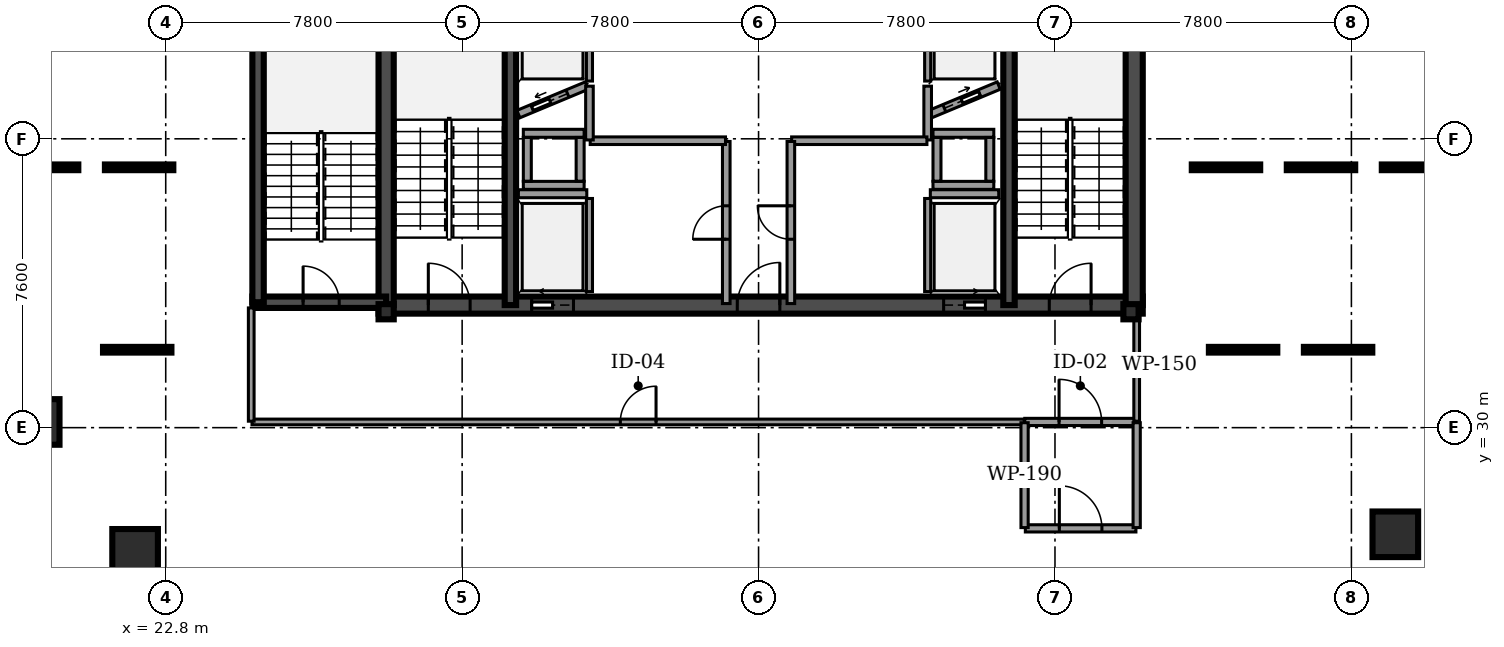
"""IFC4 building model, lengths in metres.
Left out: names, types, materials, properties, quantities, classifications, styles, units other than length and angle.
Written with IfcOpenShell. Run it as: python <this file> out.ifc"""

import sys

from ifc_helpers import new_model, si_unit, direction, frame, frame_2d, origin, origin_2d, place, context, subcontext, project, spatial, rectangle, hollow_rectangle, extrude, element, fill, save


model = new_model("IFC4")
c1 = context("Model", 3, precision=1e-05, world=origin(), true_north=direction((0.0, 1.0)))
c2 = subcontext(c1, "Body", "Model", "MODEL_VIEW")
j1 = project(units=[si_unit("LENGTHUNIT", "METRE"), si_unit("PLANEANGLEUNIT", "RADIAN")], contexts=[c1])
p1 = place(None, origin())
s1 = spatial("IfcSite", under=j1, at=p1, CompositionType="ELEMENT")
p2 = place(p1, origin())
s2 = spatial("IfcBuilding", under=s1, at=p2, CompositionType="ELEMENT")
p3 = place(p2, frame((0.0, 0.0, -8.16)))
s3 = spatial("IfcBuildingStorey", under=s2, at=p3, CompositionType="ELEMENT", Elevation=-8.16)
p4 = place(p3, frame((28.4, 33.225, 0.0), z_axis=(0.0, 0.0, 1.0), x_axis=(1.0, 0.0, 0.0)))
e1 = element("IfcWall", 1, at=p4, inside=s3, PredefinedType="SHEAR", context=c2, shape_type="SweptSolid", body=[
    extrude(rectangle(XDim=20.11, YDim=0.45, at=frame_2d((10.055, 0.0))), origin(), (0.0, 0.0, 1.0), 3.76),
])
p5 = place(p4, frame((4.03, 0.0, 0.0)))
e2 = element("IfcOpeningElement", 2, at=p5, cuts=e1, PredefinedType="OPENING", context=c2, shape_type="SweptSolid", body=[
    extrude(rectangle(XDim=1.1, YDim=2.15, at=frame_2d((0.55, 1.075))), frame((0.0, 0.235, 0.0), z_axis=(0.0, -1.0, 0.0), x_axis=(1.0, 0.0, 0.0)), (0.0, 0.0, 1.0), 0.47),
])
p6 = place(p4, frame((14.87, 0.0, 0.0)))
e3 = element("IfcOpeningElement", 3, at=p6, cuts=e1, PredefinedType="OPENING", context=c2, shape_type="SweptSolid", body=[
    extrude(rectangle(XDim=1.1, YDim=2.15, at=frame_2d((0.55, 1.075))), frame((0.0, 0.235, 0.0), z_axis=(0.0, -1.0, 0.0), x_axis=(1.0, 0.0, 0.0)), (0.0, 0.0, 1.0), 0.47),
])
p7 = place(p4, frame((1.31, 0.0, 0.0)))
e4 = element("IfcOpeningElement", 4, at=p7, cuts=e1, PredefinedType="OPENING", context=c2, shape_type="SweptSolid", body=[
    extrude(rectangle(XDim=1.1, YDim=2.2, at=frame_2d((0.55, 1.1))), frame((0.0, 0.235, 0.0), z_axis=(0.0, -1.0, 0.0), x_axis=(1.0, 0.0, 0.0)), (0.0, 0.0, 1.0), 0.47),
])
p8 = place(p4, frame((9.44, 0.0, 0.0)))
e5 = element("IfcOpeningElement", 5, at=p8, cuts=e1, PredefinedType="OPENING", context=c2, shape_type="SweptSolid", body=[
    extrude(rectangle(XDim=1.12, YDim=2.05, at=frame_2d((0.56, 1.025))), frame((0.0, 0.235, 0.0), z_axis=(0.0, -1.0, 0.0), x_axis=(1.0, 0.0, 0.0)), (0.0, 0.0, 1.0), 0.47),
])
p9 = place(p4, frame((17.65, 0.0, 0.0)))
e6 = element("IfcOpeningElement", 6, at=p9, cuts=e1, PredefinedType="OPENING", context=c2, shape_type="SweptSolid", body=[
    extrude(rectangle(XDim=1.1, YDim=2.2, at=frame_2d((0.55, 1.1))), frame((0.0, 0.235, 0.0), z_axis=(0.0, -1.0, 0.0), x_axis=(1.0, 0.0, 0.0)), (0.0, 0.0, 1.0), 0.47),
])
p10 = place(p3, frame((28.6, 33.225, 0.0), z_axis=(0.0, 0.0, 1.0), x_axis=(0.0, 1.0, 0.0)))
e7 = element("IfcWall", 7, at=p10, inside=s3, PredefinedType="SHEAR", context=c2, shape_type="SweptSolid", body=[
    extrude(rectangle(XDim=10.25, YDim=0.4, at=frame_2d((5.125, 0.0))), origin(), (0.0, 0.0, 1.0), 3.76),
])
for number, where, z_axis, x_axis in (
    (8, (31.87, 33.225, 0.0), (0.0, 0.0, 1.0), (0.0, 1.0, 0.0)),
    (9, (44.99, 33.225, 0.0), (0.0, 0.0, 1.0), (0.0, 1.0, 0.0)),
):
    element("IfcWall", number, at=place(p3, frame(where, z_axis=z_axis, x_axis=x_axis)), inside=s3, PredefinedType="SHEAR", context=c2, shape_type="SweptSolid", body=[
        extrude(rectangle(XDim=10.25, YDim=0.3, at=frame_2d((5.125, 0.0))), origin(), (0.0, 0.0, 1.0), 3.76),
    ])
p11 = place(p3, frame((48.285, 33.225, 0.0), z_axis=(0.0, 0.0, 1.0), x_axis=(0.0, 1.0, 0.0)))
e10 = element("IfcWall", 10, at=p11, inside=s3, PredefinedType="SHEAR", context=c2, shape_type="SweptSolid", body=[
    extrude(rectangle(XDim=10.25, YDim=0.45, at=frame_2d((5.125, 0.0))), origin(), (0.0, 0.0, 1.0), 3.76),
])
p12 = place(p3, frame((25.08, 33.3, 0.0), z_axis=(0.0, 0.0, 1.0), x_axis=(1.0, 0.0, 0.0)))
e11 = element("IfcWall", 11, at=p12, inside=s3, PredefinedType="SHEAR", context=c2, shape_type="SweptSolid", body=[
    extrude(rectangle(XDim=3.52, YDim=0.3, at=frame_2d((1.76, 0.0))), origin(), (0.0, 0.0, 1.0), 3.76),
])
p13 = place(p12, frame((1.335, 0.0, 0.0)))
e12 = element("IfcOpeningElement", 12, at=p13, cuts=e11, PredefinedType="OPENING", context=c2, shape_type="SweptSolid", body=[
    extrude(rectangle(XDim=0.95, YDim=2.2, at=frame_2d((0.475, 1.1))), frame((0.0, 0.16, 0.0), z_axis=(0.0, -1.0, 0.0), x_axis=(1.0, 0.0, 0.0)), (0.0, 0.0, 1.0), 0.32),
])
p14 = place(p3, frame((25.23, 33.3, 0.0), z_axis=(0.0, 0.0, 1.0), x_axis=(0.0, 1.0, 0.0)))
e13 = element("IfcWall", 13, at=p14, inside=s3, PredefinedType="SHEAR", context=c2, shape_type="SweptSolid", body=[
    extrude(rectangle(XDim=7.6, YDim=0.3, at=frame_2d((3.8, 0.0))), origin(), (0.0, 0.0, 1.0), 3.76),
])
for number, where, z_axis, x_axis in (
    (14, (19.405, 30.15, 0.0), (0.0, 0.0, 1.0), (1.0, 0.0, 0.0)),
    (15, (21.994, 26.732, 0.0), (0.0, 0.0, 1.0), (1.0, 0.0, 0.0)),
    (16, (55.156, 27.194, 0.0), (0.0, 0.0, 1.0), (1.0, 0.0, 0.0)),
):
    element("IfcColumn", number, at=place(p3, frame(where, z_axis=z_axis, x_axis=x_axis)), inside=s3, PredefinedType="COLUMN", context=c2, shape_type="SweptSolid", body=[
        extrude(hollow_rectangle(XDim=1.2, YDim=1.2, WallThickness=0.06, at=origin_2d()), origin(), (0.0, 0.0, 1.0), 3.76),
    ])
for number, where, z_axis, x_axis in (
    (17, (28.6, 33.05, 0.0), (0.0, 0.0, 1.0), (1.0, 0.0, 0.0)),
    (18, (48.2, 33.05, 0.0), (0.0, 0.0, 1.0), (1.0, 0.0, 0.0)),
):
    element("IfcColumn", number, at=place(p3, frame(where, z_axis=z_axis, x_axis=x_axis)), inside=s3, PredefinedType="PILASTER", context=c2, shape_type="SweptSolid", body=[
        extrude(hollow_rectangle(XDim=0.4, YDim=0.4, WallThickness=0.02, at=origin_2d()), origin(), (0.0, 0.0, 1.0), 3.76),
    ])
p15 = place(p3, frame((32.08, 36.155, 0.0), z_axis=(0.0, 0.0, 1.0), x_axis=(1.0, 0.0, 0.0)))
e19 = element("IfcWall", 19, at=p15, inside=s3, PredefinedType="SOLIDWALL", context=c2, shape_type="SweptSolid", body=[
    extrude(rectangle(XDim=1.8, YDim=0.21, at=frame_2d((0.9, 0.0))), origin(), (0.0, 0.0, 1.0), 2.732),
])
p16 = place(p3, frame((33.95, 33.58, 0.0), z_axis=(0.0, 0.0, 1.0), x_axis=(0.0, 1.0, 0.0)))
e20 = element("IfcWall", 20, at=p16, inside=s3, PredefinedType="SOLIDWALL", context=c2, shape_type="SweptSolid", body=[
    extrude(rectangle(XDim=2.45, YDim=0.16, at=frame_2d((1.225, 0.0))), origin(), (0.0, 0.0, 1.0), 2.732),
])
p17 = place(p3, frame((42.92, 36.155, 0.0), z_axis=(0.0, 0.0, 1.0), x_axis=(1.0, 0.0, 0.0)))
e21 = element("IfcWall", 21, at=p17, inside=s3, PredefinedType="SOLIDWALL", context=c2, shape_type="SweptSolid", body=[
    extrude(rectangle(XDim=1.8, YDim=0.21, at=frame_2d((0.9, 0.0))), origin(), (0.0, 0.0, 1.0), 2.732),
])
p18 = place(p3, frame((42.85, 33.58, 0.0), z_axis=(0.0, 0.0, 1.0), x_axis=(0.0, 1.0, 0.0)))
e22 = element("IfcWall", 22, at=p18, inside=s3, PredefinedType="SOLIDWALL", context=c2, shape_type="SweptSolid", body=[
    extrude(rectangle(XDim=2.45, YDim=0.16, at=frame_2d((1.225, 0.0))), origin(), (0.0, 0.0, 1.0), 2.732),
])
p19 = place(p3, frame((32.08, 38.25, 0.0), z_axis=(0.0, 0.0, 1.0), x_axis=(0.923062104416, 0.384650947472, 0.0)))
e23 = element("IfcWall", 23, at=p19, inside=s3, PredefinedType="SOLIDWALL", context=c2, shape_type="SweptSolid", body=[
    extrude(rectangle(XDim=1.95, YDim=0.21, at=frame_2d((0.975, 0.0))), origin(), (0.0, 0.0, 1.0), 2.732),
])
p20 = place(p19, frame((0.4, 0.0, 0.0)))
e24 = element("IfcOpeningElement", 24, at=p20, cuts=e23, PredefinedType="OPENING", context=c2, shape_type="SweptSolid", body=[
    extrude(rectangle(XDim=1.0, YDim=2.1, at=frame_2d((0.5, 1.05))), frame((0.0, 0.115, 0.0), z_axis=(0.0, -1.0, 0.0), x_axis=(1.0, 0.0, 0.0)), (0.0, 0.0, 1.0), 0.23),
])
p21 = place(p3, frame((33.95, 39.12, 0.0), z_axis=(0.0, 0.0, 1.0), x_axis=(0.0, 1.0, 0.0)))
e25 = element("IfcWall", 25, at=p21, inside=s3, PredefinedType="SOLIDWALL", context=c2, shape_type="SweptSolid", body=[
    extrude(rectangle(XDim=2.21, YDim=0.16, at=frame_2d((1.105, 0.0))), origin(), (0.0, 0.0, 1.0), 2.732),
])
p22 = place(p3, frame((42.92, 38.25, 0.0), z_axis=(0.0, 0.0, 1.0), x_axis=(0.9230806271, 0.384606494839, 0.0)))
e26 = element("IfcWall", 26, at=p22, inside=s3, PredefinedType="SOLIDWALL", context=c2, shape_type="SweptSolid", body=[
    extrude(rectangle(XDim=1.95, YDim=0.21, at=frame_2d((0.975, 0.0))), origin(), (0.0, 0.0, 1.0), 2.732),
])
p23 = place(p22, frame((0.4, 0.0, 0.0)))
e27 = element("IfcOpeningElement", 27, at=p23, cuts=e26, PredefinedType="OPENING", context=c2, shape_type="SweptSolid", body=[
    extrude(rectangle(XDim=1.0, YDim=2.1, at=frame_2d((0.5, 1.05))), frame((0.0, 0.115, 0.0), z_axis=(0.0, -1.0, 0.0), x_axis=(1.0, 0.0, 0.0)), (0.0, 0.0, 1.0), 0.23),
])
p24 = place(p3, frame((42.85, 39.12, 0.0), z_axis=(0.0, 0.0, 1.0), x_axis=(0.0, 1.0, 0.0)))
e28 = element("IfcWall", 28, at=p24, inside=s3, PredefinedType="SOLIDWALL", context=c2, shape_type="SweptSolid", body=[
    extrude(rectangle(XDim=2.21, YDim=0.16, at=frame_2d((1.105, 0.0))), origin(), (0.0, 0.0, 1.0), 2.732),
])
for number, where, z_axis, x_axis in (
    (29, (32.21, 36.375, 0.0), (0.0, 0.0, 1.0), (1.0, 0.0, 0.0)),
    (30, (32.21, 37.745, 0.0), (0.0, 0.0, 1.0), (1.0, 0.0, 0.0)),
):
    element("IfcWall", number, at=place(p3, frame(where, z_axis=z_axis, x_axis=x_axis)), inside=s3, PredefinedType="SOLIDWALL", context=c2, shape_type="SweptSolid", body=[
        extrude(rectangle(XDim=1.6, YDim=0.21, at=frame_2d((0.8, 0.0))), origin(), (0.0, 0.0, 1.0), 3.76),
    ])
for number, where, z_axis, x_axis in (
    (31, (32.315, 36.485, 0.0), (0.0, 0.0, 1.0), (0.0, 1.0, 0.0)),
    (32, (33.705, 36.485, 0.0), (0.0, 0.0, 1.0), (0.0, 1.0, 0.0)),
):
    element("IfcWall", number, at=place(p3, frame(where, z_axis=z_axis, x_axis=x_axis)), inside=s3, PredefinedType="SOLIDWALL", context=c2, shape_type="SweptSolid", body=[
        extrude(rectangle(XDim=1.15, YDim=0.21, at=frame_2d((0.575, 0.0))), origin(), (0.0, 0.0, 1.0), 3.76),
    ])
for number, where, z_axis, x_axis in (
    (33, (42.99, 36.375, 0.0), (0.0, 0.0, 1.0), (1.0, 0.0, 0.0)),
    (34, (42.99, 37.745, 0.0), (0.0, 0.0, 1.0), (1.0, 0.0, 0.0)),
):
    element("IfcWall", number, at=place(p3, frame(where, z_axis=z_axis, x_axis=x_axis)), inside=s3, PredefinedType="SOLIDWALL", context=c2, shape_type="SweptSolid", body=[
        extrude(rectangle(XDim=1.6, YDim=0.21, at=frame_2d((0.8, 0.0))), origin(), (0.0, 0.0, 1.0), 3.76),
    ])
for number, where, z_axis, x_axis in (
    (35, (43.095, 36.485, 0.0), (0.0, 0.0, 1.0), (0.0, 1.0, 0.0)),
    (36, (44.485, 36.485, 0.0), (0.0, 0.0, 1.0), (0.0, 1.0, 0.0)),
):
    element("IfcWall", number, at=place(p3, frame(where, z_axis=z_axis, x_axis=x_axis)), inside=s3, PredefinedType="SOLIDWALL", context=c2, shape_type="SweptSolid", body=[
        extrude(rectangle(XDim=1.15, YDim=0.21, at=frame_2d((0.575, 0.0))), origin(), (0.0, 0.0, 1.0), 3.76),
    ])
p25 = place(p3, frame((37.55, 33.265, 0.0), z_axis=(0.0, 0.0, 1.0), x_axis=(0.0, 1.0, 0.0)))
e37 = element("IfcWall", 37, at=p25, inside=s3, PredefinedType="PARTITIONING", context=c2, shape_type="SweptSolid", body=[
    extrude(rectangle(XDim=4.265, YDim=0.2, at=frame_2d((2.133, 0.0))), origin(), (0.0, 0.0, 1.0), 2.717),
])
p26 = place(p25, frame((1.692, 0.0, 0.0)))
e38 = element("IfcOpeningElement", 38, at=p26, cuts=e37, PredefinedType="OPENING", context=c2, shape_type="SweptSolid", body=[
    extrude(rectangle(XDim=0.88, YDim=2.05, at=frame_2d((0.44, 1.025))), frame((0.0, 0.11, 0.0), z_axis=(0.0, -1.0, 0.0), x_axis=(1.0, 0.0, 0.0)), (0.0, 0.0, 1.0), 0.22),
])
p27 = place(p3, frame((33.97, 37.55, 0.0), z_axis=(0.0, 0.0, 1.0), x_axis=(1.0, 0.0, 0.0)))
e39 = element("IfcWall", 39, at=p27, inside=s3, PredefinedType="PARTITIONING", context=c2, shape_type="SweptSolid", body=[
    extrude(rectangle(XDim=3.56, YDim=0.2, at=frame_2d((1.78, 0.0))), origin(), (0.0, 0.0, 1.0), 2.717),
])
for number, where, z_axis, x_axis in (
    (40, (33.95, 37.57, 0.0), (0.0, 0.0, 1.0), (0.0, 1.0, 0.0)),
    (41, (42.85, 37.57, 0.0), (0.0, 0.0, 1.0), (0.0, 1.0, 0.0)),
):
    element("IfcWall", number, at=place(p3, frame(where, z_axis=z_axis, x_axis=x_axis)), inside=s3, PredefinedType="PARTITIONING", context=c2, shape_type="SweptSolid", body=[
        extrude(rectangle(XDim=1.415, YDim=0.2, at=frame_2d((0.708, 0.0))), origin(), (0.0, 0.0, 1.0), 2.717),
    ])
p28 = place(p3, frame((39.27, 37.55, 0.0), z_axis=(0.0, 0.0, 1.0), x_axis=(1.0, 0.0, 0.0)))
e42 = element("IfcWall", 42, at=p28, inside=s3, PredefinedType="PARTITIONING", context=c2, shape_type="SweptSolid", body=[
    extrude(rectangle(XDim=3.56, YDim=0.2, at=frame_2d((1.78, 0.0))), origin(), (0.0, 0.0, 1.0), 2.717),
])
p29 = place(p3, frame((39.25, 33.265, 0.0), z_axis=(0.0, 0.0, 1.0), x_axis=(0.0, 1.0, 0.0)))
e43 = element("IfcWall", 43, at=p29, inside=s3, PredefinedType="PARTITIONING", context=c2, shape_type="SweptSolid", body=[
    extrude(rectangle(XDim=4.265, YDim=0.2, at=frame_2d((2.133, 0.0))), origin(), (0.0, 0.0, 1.0), 2.717),
])
p30 = place(p29, frame((1.692, 0.0, 0.0)))
e44 = element("IfcOpeningElement", 44, at=p30, cuts=e43, PredefinedType="OPENING", context=c2, shape_type="SweptSolid", body=[
    extrude(rectangle(XDim=0.88, YDim=2.05, at=frame_2d((0.44, 1.025))), frame((0.0, 0.11, 0.0), z_axis=(0.0, -1.0, 0.0), x_axis=(1.0, 0.0, 0.0)), (0.0, 0.0, 1.0), 0.22),
])
p31 = place(p3, frame((45.405, 30.15, 0.0), z_axis=(0.0, 0.0, 1.0), x_axis=(1.0, 0.0, 0.0)))
e45 = element("IfcWall", 45, at=p31, inside=s3, PredefinedType="PARTITIONING", context=c2, shape_type="SweptSolid", body=[
    extrude(rectangle(XDim=2.925, YDim=0.19, at=frame_2d((1.462, 0.0))), origin(), (0.0, 0.0, 1.0), 2.717),
])
p32 = place(p31, frame((0.903, 0.0, 0.0)))
e46 = element("IfcOpeningElement", 46, at=p32, cuts=e45, PredefinedType="OPENING", context=c2, shape_type="SweptSolid", body=[
    extrude(rectangle(XDim=1.12, YDim=2.05, at=frame_2d((0.56, 1.025))), frame((0.0, 0.105, 0.0), z_axis=(0.0, -1.0, 0.0), x_axis=(1.0, 0.0, 0.0)), (0.0, 0.0, 1.0), 0.21),
])
p33 = place(p3, frame((48.35, 30.17, 0.0), z_axis=(0.0, 0.0, 1.0), x_axis=(0.0, 1.0, 0.0)))
e47 = element("IfcWall", 47, at=p33, inside=s3, PredefinedType="PARTITIONING", context=c2, shape_type="SweptSolid", body=[
    extrude(rectangle(XDim=2.975, YDim=0.15, at=frame_2d((1.488, 0.0))), origin(), (0.0, 0.0, 1.0), 2.717),
])
p34 = place(p3, frame((25.07, 30.15, 0.0), z_axis=(0.0, 0.0, 1.0), x_axis=(1.0, 0.0, 0.0)))
e48 = element("IfcWall", 48, at=p34, inside=s3, PredefinedType="PARTITIONING", context=c2, shape_type="SweptSolid", body=[
    extrude(rectangle(XDim=20.325, YDim=0.15, at=frame_2d((10.163, 0.0))), origin(), (0.0, 0.0, 1.0), 2.717),
])
p35 = place(p34, frame((9.692, 0.0, 0.0)))
e49 = element("IfcOpeningElement", 49, at=p35, cuts=e48, PredefinedType="OPENING", context=c2, shape_type="SweptSolid", body=[
    extrude(rectangle(XDim=0.94, YDim=2.05, at=frame_2d((0.47, 1.025))), frame((0.0, 0.085, 0.0), z_axis=(0.0, -1.0, 0.0), x_axis=(1.0, 0.0, 0.0)), (0.0, 0.0, 1.0), 0.17),
])
p36 = place(p3, frame((25.05, 30.17, 0.0), z_axis=(0.0, 0.0, 1.0), x_axis=(0.0, 1.0, 0.0)))
e50 = element("IfcWall", 50, at=p36, inside=s3, PredefinedType="PARTITIONING", context=c2, shape_type="SweptSolid", body=[
    extrude(rectangle(XDim=2.98, YDim=0.15, at=frame_2d((1.49, 0.0))), origin(), (0.0, 0.0, 1.0), 2.717),
])
p37 = place(p3, frame((45.42, 27.35, 0.0), z_axis=(0.0, 0.0, 1.0), x_axis=(1.0, 0.0, 0.0)))
e51 = element("IfcWall", 51, at=p37, inside=s3, PredefinedType="PARTITIONING", context=c2, shape_type="SweptSolid", body=[
    extrude(rectangle(XDim=2.91, YDim=0.19, at=frame_2d((1.455, 0.0))), origin(), (0.0, 0.0, 1.0), 2.717),
])
p38 = place(p37, frame((0.895, 0.0, 0.0)))
e52 = element("IfcOpeningElement", 52, at=p38, cuts=e51, PredefinedType="OPENING", context=c2, shape_type="SweptSolid", body=[
    extrude(rectangle(XDim=1.12, YDim=2.05, at=frame_2d((0.56, 1.025))), frame((0.0, 0.105, 0.0), z_axis=(0.0, -1.0, 0.0), x_axis=(1.0, 0.0, 0.0)), (0.0, 0.0, 1.0), 0.21),
])
for number, where, z_axis, x_axis in (
    (53, (45.4, 27.37, 0.0), (0.0, 0.0, 1.0), (0.0, 1.0, 0.0)),
    (54, (48.35, 27.37, 0.0), (0.0, 0.0, 1.0), (0.0, 1.0, 0.0)),
):
    element("IfcWall", number, at=place(p3, frame(where, z_axis=z_axis, x_axis=x_axis)), inside=s3, PredefinedType="PARTITIONING", context=c2, shape_type="SweptSolid", body=[
        extrude(rectangle(XDim=2.76, YDim=0.19, at=frame_2d((1.38, 0.0))), origin(), (0.0, 0.0, 1.0), 2.717),
    ])
p39 = place(p5, origin())
e55 = element("IfcDoor", 55, at=p39, inside=s3, OperationType="SLIDING_TO_LEFT", PredefinedType="DOOR", context=c2, shape_type="SweptSolid", body=[
    extrude(rectangle(XDim=1.1, YDim=2.15, at=frame_2d((0.55, 1.075))), frame((0.0, 0.025, 0.0), z_axis=(0.0, -1.0, 0.0), x_axis=(1.0, 0.0, 0.0)), (0.0, 0.0, 1.0), 0.05),
])
fill(e2, e55)
p40 = place(p6, origin())
e56 = element("IfcDoor", 56, at=p40, inside=s3, OperationType="SLIDING_TO_RIGHT", PredefinedType="DOOR", context=c2, shape_type="SweptSolid", body=[
    extrude(rectangle(XDim=1.1, YDim=2.15, at=frame_2d((0.55, 1.075))), frame((0.0, 0.025, 0.0), z_axis=(0.0, -1.0, 0.0), x_axis=(1.0, 0.0, 0.0)), (0.0, 0.0, 1.0), 0.05),
])
fill(e3, e56)
p41 = place(p20, origin())
e57 = element("IfcDoor", 57, at=p41, inside=s3, OperationType="SLIDING_TO_LEFT", PredefinedType="DOOR", context=c2, shape_type="SweptSolid", body=[
    extrude(rectangle(XDim=1.0, YDim=2.1, at=frame_2d((0.5, 1.05))), frame((0.0, 0.025, 0.0), z_axis=(0.0, -1.0, 0.0), x_axis=(1.0, 0.0, 0.0)), (0.0, 0.0, 1.0), 0.05),
])
fill(e24, e57)
p42 = place(p23, origin())
e58 = element("IfcDoor", 58, at=p42, inside=s3, OperationType="SLIDING_TO_RIGHT", PredefinedType="DOOR", context=c2, shape_type="SweptSolid", body=[
    extrude(rectangle(XDim=1.0, YDim=2.1, at=frame_2d((0.5, 1.05))), frame((0.0, 0.025, 0.0), z_axis=(0.0, -1.0, 0.0), x_axis=(1.0, 0.0, 0.0)), (0.0, 0.0, 1.0), 0.05),
])
fill(e27, e58)
p43 = place(p7, origin())
e59 = element("IfcDoor", 59, at=p43, inside=s3, OperationType="SINGLE_SWING_LEFT", PredefinedType="DOOR", context=c2, shape_type="SweptSolid", body=[
    extrude(rectangle(XDim=1.1, YDim=2.2, at=frame_2d((0.55, 1.1))), frame((0.0, 0.025, 0.0), z_axis=(0.0, -1.0, 0.0), x_axis=(1.0, 0.0, 0.0)), (0.0, 0.0, 1.0), 0.05),
])
fill(e4, e59)
p44 = place(p8, origin())
e60 = element("IfcDoor", 60, at=p44, inside=s3, OperationType="SINGLE_SWING_RIGHT", PredefinedType="DOOR", context=c2, shape_type="SweptSolid", body=[
    extrude(rectangle(XDim=1.12, YDim=2.05, at=frame_2d((0.56, 1.025))), frame((0.0, 0.025, 0.0), z_axis=(0.0, -1.0, 0.0), x_axis=(1.0, 0.0, 0.0)), (0.0, 0.0, 1.0), 0.05),
])
fill(e5, e60)
p45 = place(p9, origin())
e61 = element("IfcDoor", 61, at=p45, inside=s3, OperationType="SINGLE_SWING_RIGHT", PredefinedType="DOOR", context=c2, shape_type="SweptSolid", body=[
    extrude(rectangle(XDim=1.1, YDim=2.2, at=frame_2d((0.55, 1.1))), frame((0.0, 0.025, 0.0), z_axis=(0.0, -1.0, 0.0), x_axis=(1.0, 0.0, 0.0)), (0.0, 0.0, 1.0), 0.05),
])
fill(e6, e61)
p46 = place(p13, origin())
e62 = element("IfcDoor", 62, at=p46, inside=s3, OperationType="SINGLE_SWING_LEFT", PredefinedType="DOOR", context=c2, shape_type="SweptSolid", body=[
    extrude(rectangle(XDim=0.95, YDim=2.2, at=frame_2d((0.475, 1.1))), frame((0.0, 0.025, 0.0), z_axis=(0.0, -1.0, 0.0), x_axis=(1.0, 0.0, 0.0)), (0.0, 0.0, 1.0), 0.05),
])
fill(e12, e62)
p47 = place(p26, origin())
e63 = element("IfcDoor", 63, at=p47, inside=s3, OperationType="SINGLE_SWING_LEFT", PredefinedType="DOOR", context=c2, shape_type="SweptSolid", body=[
    extrude(rectangle(XDim=0.88, YDim=2.05, at=frame_2d((0.44, 1.025))), frame((0.0, 0.025, 0.0), z_axis=(0.0, -1.0, 0.0), x_axis=(1.0, 0.0, 0.0)), (0.0, 0.0, 1.0), 0.05),
])
fill(e38, e63)
p48 = place(p30, origin())
e64 = element("IfcDoor", 64, at=p48, inside=s3, OperationType="SINGLE_SWING_RIGHT", PredefinedType="DOOR", context=c2, shape_type="SweptSolid", body=[
    extrude(rectangle(XDim=0.88, YDim=2.05, at=frame_2d((0.44, 1.025))), frame((0.0, 0.025, 0.0), z_axis=(0.0, -1.0, 0.0), x_axis=(1.0, 0.0, 0.0)), (0.0, 0.0, 1.0), 0.05),
])
fill(e44, e64)
p49 = place(p32, origin())
e65 = element("IfcDoor", 65, at=p49, inside=s3, OperationType="SINGLE_SWING_LEFT", PredefinedType="DOOR", context=c2, shape_type="SweptSolid", body=[
    extrude(rectangle(XDim=1.12, YDim=2.05, at=frame_2d((0.56, 1.025))), frame((0.0, 0.025, 0.0), z_axis=(0.0, -1.0, 0.0), x_axis=(1.0, 0.0, 0.0)), (0.0, 0.0, 1.0), 0.05),
])
fill(e46, e65)
p50 = place(p35, origin())
e66 = element("IfcDoor", 66, at=p50, inside=s3, OperationType="SINGLE_SWING_RIGHT", PredefinedType="DOOR", context=c2, shape_type="SweptSolid", body=[
    extrude(rectangle(XDim=0.94, YDim=2.05, at=frame_2d((0.47, 1.025))), frame((0.0, 0.025, 0.0), z_axis=(0.0, -1.0, 0.0), x_axis=(1.0, 0.0, 0.0)), (0.0, 0.0, 1.0), 0.05),
])
fill(e49, e66)
p51 = place(p38, origin())
e67 = element("IfcDoor", 67, at=p51, inside=s3, OperationType="SINGLE_SWING_LEFT", PredefinedType="DOOR", context=c2, shape_type="SweptSolid", body=[
    extrude(rectangle(XDim=1.12, YDim=2.05, at=frame_2d((0.56, 1.025))), frame((0.0, 0.025, 0.0), z_axis=(0.0, -1.0, 0.0), x_axis=(1.0, 0.0, 0.0)), (0.0, 0.0, 1.0), 0.05),
])
fill(e52, e67)
save(model, sys.argv[1])
